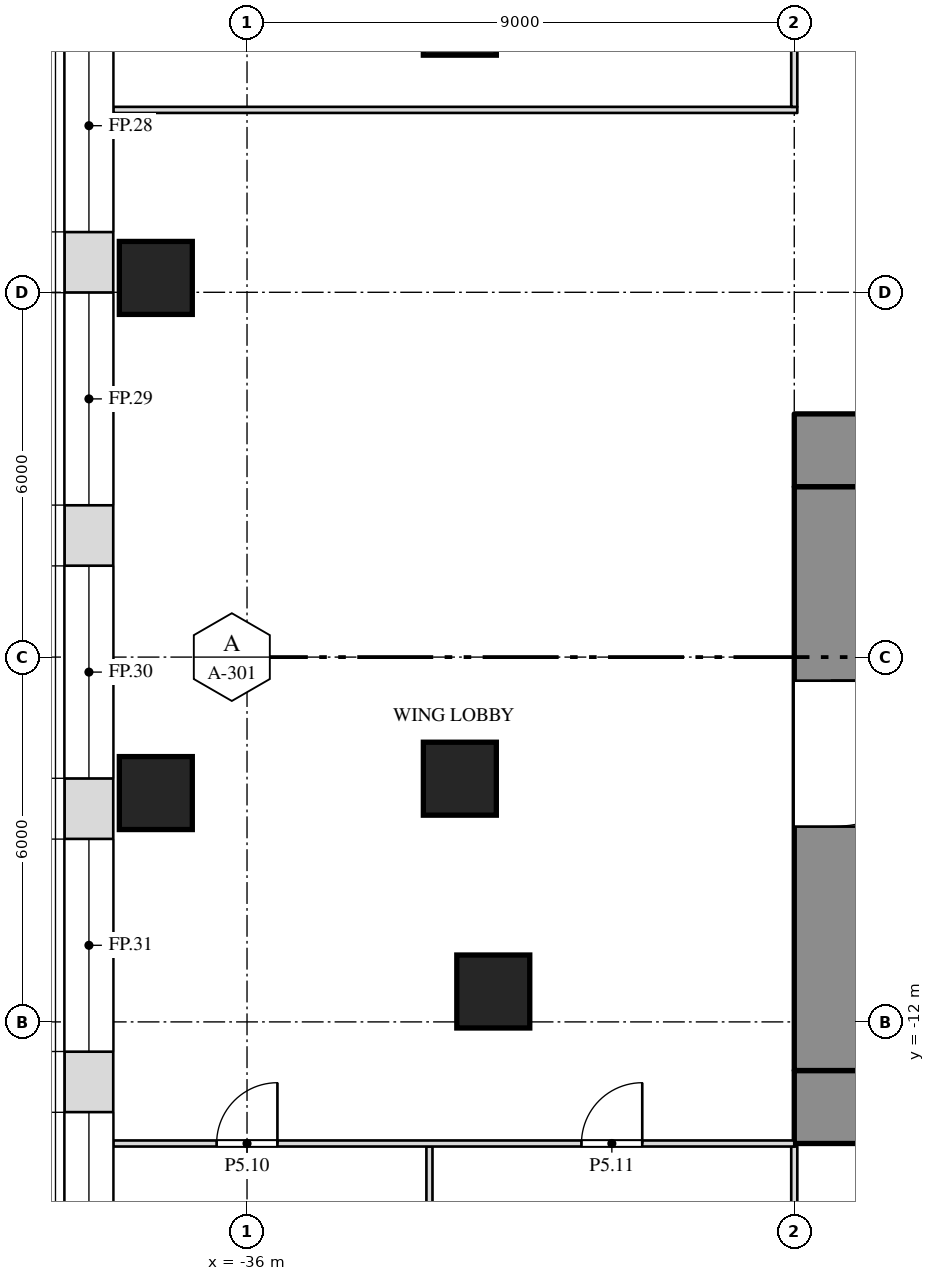
"""IFC4 building model, lengths in metres.
Left out: names, types, materials, properties, quantities, classifications, styles, units other than length and angle.
Written with IfcOpenShell. Run it as: python <this file> out.ifc"""

import sys

from ifc_helpers import new_model, si_unit, direction, frame, frame_2d, origin, origin_2d, place, context, subcontext, project, spatial, rectangle, extrude, element, fill, save


model = new_model("IFC4")
c1 = context("Model", 3, precision=1e-05, world=origin(), true_north=direction((0.0, 1.0)))
c2 = subcontext(c1, "Body", "Model", "MODEL_VIEW")
j1 = project(units=[si_unit("LENGTHUNIT", "METRE"), si_unit("PLANEANGLEUNIT", "RADIAN")], contexts=[c1])
p1 = place(None, origin())
s1 = spatial("IfcSite", under=j1, at=p1, CompositionType="ELEMENT")
p2 = place(p1, origin())
s2 = spatial("IfcBuilding", under=s1, at=p2, CompositionType="ELEMENT")
p3 = place(p2, frame((0.0, 0.0, 33.0)))
s3 = spatial("IfcBuildingStorey", under=s2, at=p3, CompositionType="ELEMENT", Elevation=33.0)
for number, where, z_axis, x_axis in (
    (1, (-31.95, -11.5, 0.0), (0.0, 0.0, 1.0), (1.0, 0.0, 0.0)),
    (2, (-37.5, -8.236, 0.0), (0.0, 0.0, 1.0), (1.0, 0.0, 0.0)),
    (3, (-32.5, -8.0, 0.0), (0.0, 0.0, 1.0), (1.0, 0.0, 0.0)),
    (4, (-37.5, 0.236, 0.0), (0.0, 0.0, 1.0), (1.0, 0.0, 0.0)),
    (5, (-32.5, 4.5, 0.0), (0.0, 0.0, 1.0), (1.0, 0.0, 0.0)),
):
    element("IfcColumn", number, at=place(p3, frame(where, z_axis=z_axis, x_axis=x_axis)), inside=s3, PredefinedType="COLUMN", context=c2, shape_type="SweptSolid", body=[
        extrude(rectangle(XDim=1.2, YDim=1.2, at=origin_2d()), origin(), (0.0, 0.0, 1.0), 6.0),
    ])
p4 = place(p3, frame((-27.0, -2.6, 0.0), z_axis=(0.0, 0.0, 1.0), x_axis=(1.0, 0.0, 0.0)))
e6 = element("IfcWall", 6, at=p4, inside=s3, PredefinedType="SHEAR", context=c2, shape_type="SweptSolid", body=[
    extrude(rectangle(XDim=54.0, YDim=1.2, at=frame_2d((27.0, 0.0))), origin(), (0.0, 0.0, 1.0), 5.75),
])
p5 = place(p3, frame((-27.0, -13.4, 0.0), z_axis=(0.0, 0.0, 1.0), x_axis=(1.0, 0.0, 0.0)))
e7 = element("IfcWall", 7, at=p5, inside=s3, PredefinedType="SHEAR", context=c2, shape_type="SweptSolid", body=[
    extrude(rectangle(XDim=54.0, YDim=1.2, at=frame_2d((27.0, 0.0))), origin(), (0.0, 0.0, 1.0), 5.75),
])
p6 = place(p5, frame((16.45, 0.0, 0.0)))
e8 = element("IfcOpeningElement", 8, at=p6, cuts=e7, PredefinedType="OPENING", context=c2, shape_type="SweptSolid", body=[
    extrude(rectangle(XDim=1.0, YDim=2.1, at=frame_2d((0.5, 1.05))), frame((0.0, 0.612, 0.0), z_axis=(0.0, -1.0, 0.0), x_axis=(1.0, 0.0, 0.0)), (0.0, 0.0, 1.0), 1.224),
])
p7 = place(p5, frame((36.55, 0.0, 0.0)))
e9 = element("IfcOpeningElement", 9, at=p7, cuts=e7, PredefinedType="OPENING", context=c2, shape_type="SweptSolid", body=[
    extrude(rectangle(XDim=1.0, YDim=2.1, at=frame_2d((0.5, 1.05))), frame((0.0, 0.612, 0.0), z_axis=(0.0, -1.0, 0.0), x_axis=(1.0, 0.0, 0.0)), (0.0, 0.0, 1.0), 1.224),
])
p8 = place(p3, frame((-26.4, -12.8, 0.0), z_axis=(0.0, 0.0, 1.0), x_axis=(0.0, 1.0, 0.0)))
e10 = element("IfcWall", 10, at=p8, inside=s3, PredefinedType="SHEAR", context=c2, shape_type="SweptSolid", body=[
    extrude(rectangle(XDim=9.6, YDim=1.2, at=frame_2d((4.8, 0.0))), origin(), (0.0, 0.0, 1.0), 5.75),
])
p9 = place(p8, frame((4.012, 0.0, 0.0)))
e11 = element("IfcOpeningElement", 11, at=p9, cuts=e10, PredefinedType="OPENING", context=c2, shape_type="SweptSolid", body=[
    extrude(rectangle(XDim=2.4, YDim=2.1, at=frame_2d((1.2, 1.05))), frame((0.0, 0.612, 0.0), z_axis=(0.0, -1.0, 0.0), x_axis=(1.0, 0.0, 0.0)), (0.0, 0.0, 1.0), 1.224),
])
p10 = place(p3, frame((-27.0, -16.9, 0.0), z_axis=(0.0, 0.0, 1.0), x_axis=(0.0, 1.0, 0.0)))
e12 = element("IfcWall", 12, at=p10, inside=s3, PredefinedType="PARTITIONING", context=c2, shape_type="SweptSolid", body=[
    extrude(rectangle(XDim=2.85, YDim=0.1, at=frame_2d((1.425, 0.0))), origin(), (0.0, 0.0, 1.0), 5.138),
])
p11 = place(p3, frame((-33.0, -27.19, 0.0), z_axis=(0.0, 0.0, 1.0), x_axis=(0.0, 1.0, 0.0)))
e13 = element("IfcWall", 13, at=p11, inside=s3, PredefinedType="PARTITIONING", context=c2, shape_type="SweptSolid", body=[
    extrude(rectangle(XDim=13.14, YDim=0.1, at=frame_2d((6.57, 0.0))), origin(), (0.0, 0.0, 1.0), 5.75),
])
p12 = place(p3, frame((-38.2, -14.0, 0.0), z_axis=(0.0, 0.0, 1.0), x_axis=(1.0, 0.0, 0.0)))
e14 = element("IfcWall", 14, at=p12, inside=s3, PredefinedType="PARTITIONING", context=c2, shape_type="SweptSolid", body=[
    extrude(rectangle(XDim=11.2, YDim=0.1, at=frame_2d((5.6, 0.0))), origin(), (0.0, 0.0, 1.0), 5.75),
])
p13 = place(p12, frame((1.7, 0.0, 0.0)))
e15 = element("IfcOpeningElement", 15, at=p13, cuts=e14, PredefinedType="OPENING", context=c2, shape_type="SweptSolid", body=[
    extrude(rectangle(XDim=1.0, YDim=2.1, at=frame_2d((0.5, 1.05))), frame((0.0, 0.062, 0.0), z_axis=(0.0, -1.0, 0.0), x_axis=(1.0, 0.0, 0.0)), (0.0, 0.0, 1.0), 0.124),
])
p14 = place(p12, frame((7.7, 0.0, 0.0)))
e16 = element("IfcOpeningElement", 16, at=p14, cuts=e14, PredefinedType="OPENING", context=c2, shape_type="SweptSolid", body=[
    extrude(rectangle(XDim=1.0, YDim=2.1, at=frame_2d((0.5, 1.05))), frame((0.0, 0.062, 0.0), z_axis=(0.0, -1.0, 0.0), x_axis=(1.0, 0.0, 0.0)), (0.0, 0.0, 1.0), 0.124),
])
p15 = place(p3, frame((-38.2, 3.0, 0.0), z_axis=(0.0, 0.0, 1.0), x_axis=(1.0, 0.0, 0.0)))
e17 = element("IfcWall", 17, at=p15, inside=s3, PredefinedType="PARTITIONING", context=c2, shape_type="SweptSolid", body=[
    extrude(rectangle(XDim=11.25, YDim=0.1, at=frame_2d((5.625, 0.0))), origin(), (0.0, 0.0, 1.0), 5.75),
])
p16 = place(p3, frame((-27.0, 3.05, 0.0), z_axis=(0.0, 0.0, 1.0), x_axis=(0.0, 1.0, 0.0)))
e18 = element("IfcWall", 18, at=p16, inside=s3, PredefinedType="PARTITIONING", context=c2, shape_type="SweptSolid", body=[
    extrude(rectangle(XDim=1.166, YDim=0.1, at=frame_2d((0.583, 0.0))), origin(), (0.0, 0.0, 1.0), 5.138),
])
p17 = place(p3, frame((-38.6, 13.948, 0.0), z_axis=(0.0, 0.0, 1.0), x_axis=(0.0, -1.0, 0.0)))
e19 = element("IfcWall", 19, at=p17, inside=s3, PredefinedType="SOLIDWALL", context=c2, shape_type="SweptSolid", body=[
    extrude(rectangle(XDim=35.895, YDim=0.8, at=frame_2d((17.948, 0.0))), origin(), (0.0, 0.0, 1.0), 5.75),
])
p18 = place(p17, frame((4.964, 0.0, 1.0)))
e20 = element("IfcOpeningElement", 20, at=p18, cuts=e19, PredefinedType="OPENING", context=c2, shape_type="SweptSolid", body=[
    extrude(rectangle(XDim=3.5, YDim=4.0, at=frame_2d((1.75, 2.0))), frame((0.0, 0.412, 0.0), z_axis=(0.0, -1.0, 0.0), x_axis=(1.0, 0.0, 0.0)), (0.0, 0.0, 1.0), 0.824),
])
p19 = place(p17, frame((9.458, 0.0, 1.0)))
e21 = element("IfcOpeningElement", 21, at=p19, cuts=e19, PredefinedType="OPENING", context=c2, shape_type="SweptSolid", body=[
    extrude(rectangle(XDim=3.5, YDim=4.0, at=frame_2d((1.75, 2.0))), frame((0.0, 0.412, 0.0), z_axis=(0.0, -1.0, 0.0), x_axis=(1.0, 0.0, 0.0)), (0.0, 0.0, 1.0), 0.824),
])
p20 = place(p17, frame((13.951, 0.0, 1.0)))
e22 = element("IfcOpeningElement", 22, at=p20, cuts=e19, PredefinedType="OPENING", context=c2, shape_type="SweptSolid", body=[
    extrude(rectangle(XDim=3.5, YDim=4.0, at=frame_2d((1.75, 2.0))), frame((0.0, 0.412, 0.0), z_axis=(0.0, -1.0, 0.0), x_axis=(1.0, 0.0, 0.0)), (0.0, 0.0, 1.0), 0.824),
])
p21 = place(p17, frame((18.444, 0.0, 1.0)))
e23 = element("IfcOpeningElement", 23, at=p21, cuts=e19, PredefinedType="OPENING", context=c2, shape_type="SweptSolid", body=[
    extrude(rectangle(XDim=3.5, YDim=4.0, at=frame_2d((1.75, 2.0))), frame((0.0, 0.412, 0.0), z_axis=(0.0, -1.0, 0.0), x_axis=(1.0, 0.0, 0.0)), (0.0, 0.0, 1.0), 0.824),
])
p22 = place(p17, frame((22.938, 0.0, 1.0)))
e24 = element("IfcOpeningElement", 24, at=p22, cuts=e19, PredefinedType="OPENING", context=c2, shape_type="SweptSolid", body=[
    extrude(rectangle(XDim=3.5, YDim=4.0, at=frame_2d((1.75, 2.0))), frame((0.0, 0.412, 0.0), z_axis=(0.0, -1.0, 0.0), x_axis=(1.0, 0.0, 0.0)), (0.0, 0.0, 1.0), 0.824),
])
p23 = place(p17, frame((27.431, 0.0, 1.0)))
e25 = element("IfcOpeningElement", 25, at=p23, cuts=e19, PredefinedType="OPENING", context=c2, shape_type="SweptSolid", body=[
    extrude(rectangle(XDim=3.5, YDim=4.0, at=frame_2d((1.75, 2.0))), frame((0.0, 0.412, 0.0), z_axis=(0.0, -1.0, 0.0), x_axis=(1.0, 0.0, 0.0)), (0.0, 0.0, 1.0), 0.824),
])
p24 = place(p13, origin())
e26 = element("IfcDoor", 26, at=p24, inside=s3, OperationType="SINGLE_SWING_RIGHT", PredefinedType="DOOR", context=c2, shape_type="SweptSolid", body=[
    extrude(rectangle(XDim=1.0, YDim=2.1, at=frame_2d((0.5, 1.05))), frame((0.0, 0.025, 0.0), z_axis=(0.0, -1.0, 0.0), x_axis=(1.0, 0.0, 0.0)), (0.0, 0.0, 1.0), 0.05),
])
fill(e15, e26)
p25 = place(p14, origin())
e27 = element("IfcDoor", 27, at=p25, inside=s3, OperationType="SINGLE_SWING_RIGHT", PredefinedType="DOOR", context=c2, shape_type="SweptSolid", body=[
    extrude(rectangle(XDim=1.0, YDim=2.1, at=frame_2d((0.5, 1.05))), frame((0.0, 0.025, 0.0), z_axis=(0.0, -1.0, 0.0), x_axis=(1.0, 0.0, 0.0)), (0.0, 0.0, 1.0), 0.05),
])
fill(e16, e27)
p26 = place(p19, origin())
e28 = element("IfcWindow", 28, at=p26, inside=s3, PartitioningType="SINGLE_PANEL", PredefinedType="WINDOW", context=c2, shape_type="SweptSolid", body=[
    extrude(rectangle(XDim=3.5, YDim=4.0, at=frame_2d((1.75, 2.0))), frame((0.0, 0.03, 0.0), z_axis=(0.0, -1.0, 0.0), x_axis=(1.0, 0.0, 0.0)), (0.0, 0.0, 1.0), 0.06),
])
fill(e21, e28)
p27 = place(p20, origin())
e29 = element("IfcWindow", 29, at=p27, inside=s3, PartitioningType="SINGLE_PANEL", PredefinedType="WINDOW", context=c2, shape_type="SweptSolid", body=[
    extrude(rectangle(XDim=3.5, YDim=4.0, at=frame_2d((1.75, 2.0))), frame((0.0, 0.03, 0.0), z_axis=(0.0, -1.0, 0.0), x_axis=(1.0, 0.0, 0.0)), (0.0, 0.0, 1.0), 0.06),
])
fill(e22, e29)
p28 = place(p21, origin())
e30 = element("IfcWindow", 30, at=p28, inside=s3, PartitioningType="SINGLE_PANEL", PredefinedType="WINDOW", context=c2, shape_type="SweptSolid", body=[
    extrude(rectangle(XDim=3.5, YDim=4.0, at=frame_2d((1.75, 2.0))), frame((0.0, 0.03, 0.0), z_axis=(0.0, -1.0, 0.0), x_axis=(1.0, 0.0, 0.0)), (0.0, 0.0, 1.0), 0.06),
])
fill(e23, e30)
p29 = place(p22, origin())
e31 = element("IfcWindow", 31, at=p29, inside=s3, PartitioningType="SINGLE_PANEL", PredefinedType="WINDOW", context=c2, shape_type="SweptSolid", body=[
    extrude(rectangle(XDim=3.5, YDim=4.0, at=frame_2d((1.75, 2.0))), frame((0.0, 0.03, 0.0), z_axis=(0.0, -1.0, 0.0), x_axis=(1.0, 0.0, 0.0)), (0.0, 0.0, 1.0), 0.06),
])
fill(e24, e31)
p30 = place(p23, origin())
e32 = element("IfcWindow", 32, at=p30, inside=s3, PartitioningType="SINGLE_PANEL", PredefinedType="WINDOW", context=c2, shape_type="SweptSolid", body=[
    extrude(rectangle(XDim=3.5, YDim=4.0, at=frame_2d((1.75, 2.0))), frame((0.0, 0.03, 0.0), z_axis=(0.0, -1.0, 0.0), x_axis=(1.0, 0.0, 0.0)), (0.0, 0.0, 1.0), 0.06),
])
fill(e25, e32)
p31 = place(p9, origin())
e33 = element("IfcDoor", 33, at=p31, inside=s3, OperationType="DOUBLE_DOOR_SINGLE_SWING", PredefinedType="DOOR", context=c2, shape_type="SweptSolid", body=[
    extrude(rectangle(XDim=2.4, YDim=2.1, at=frame_2d((1.2, 1.05))), frame((0.0, 0.025, 0.0), z_axis=(0.0, -1.0, 0.0), x_axis=(1.0, 0.0, 0.0)), (0.0, 0.0, 1.0), 0.05),
])
fill(e11, e33)
save(model, sys.argv[1])
